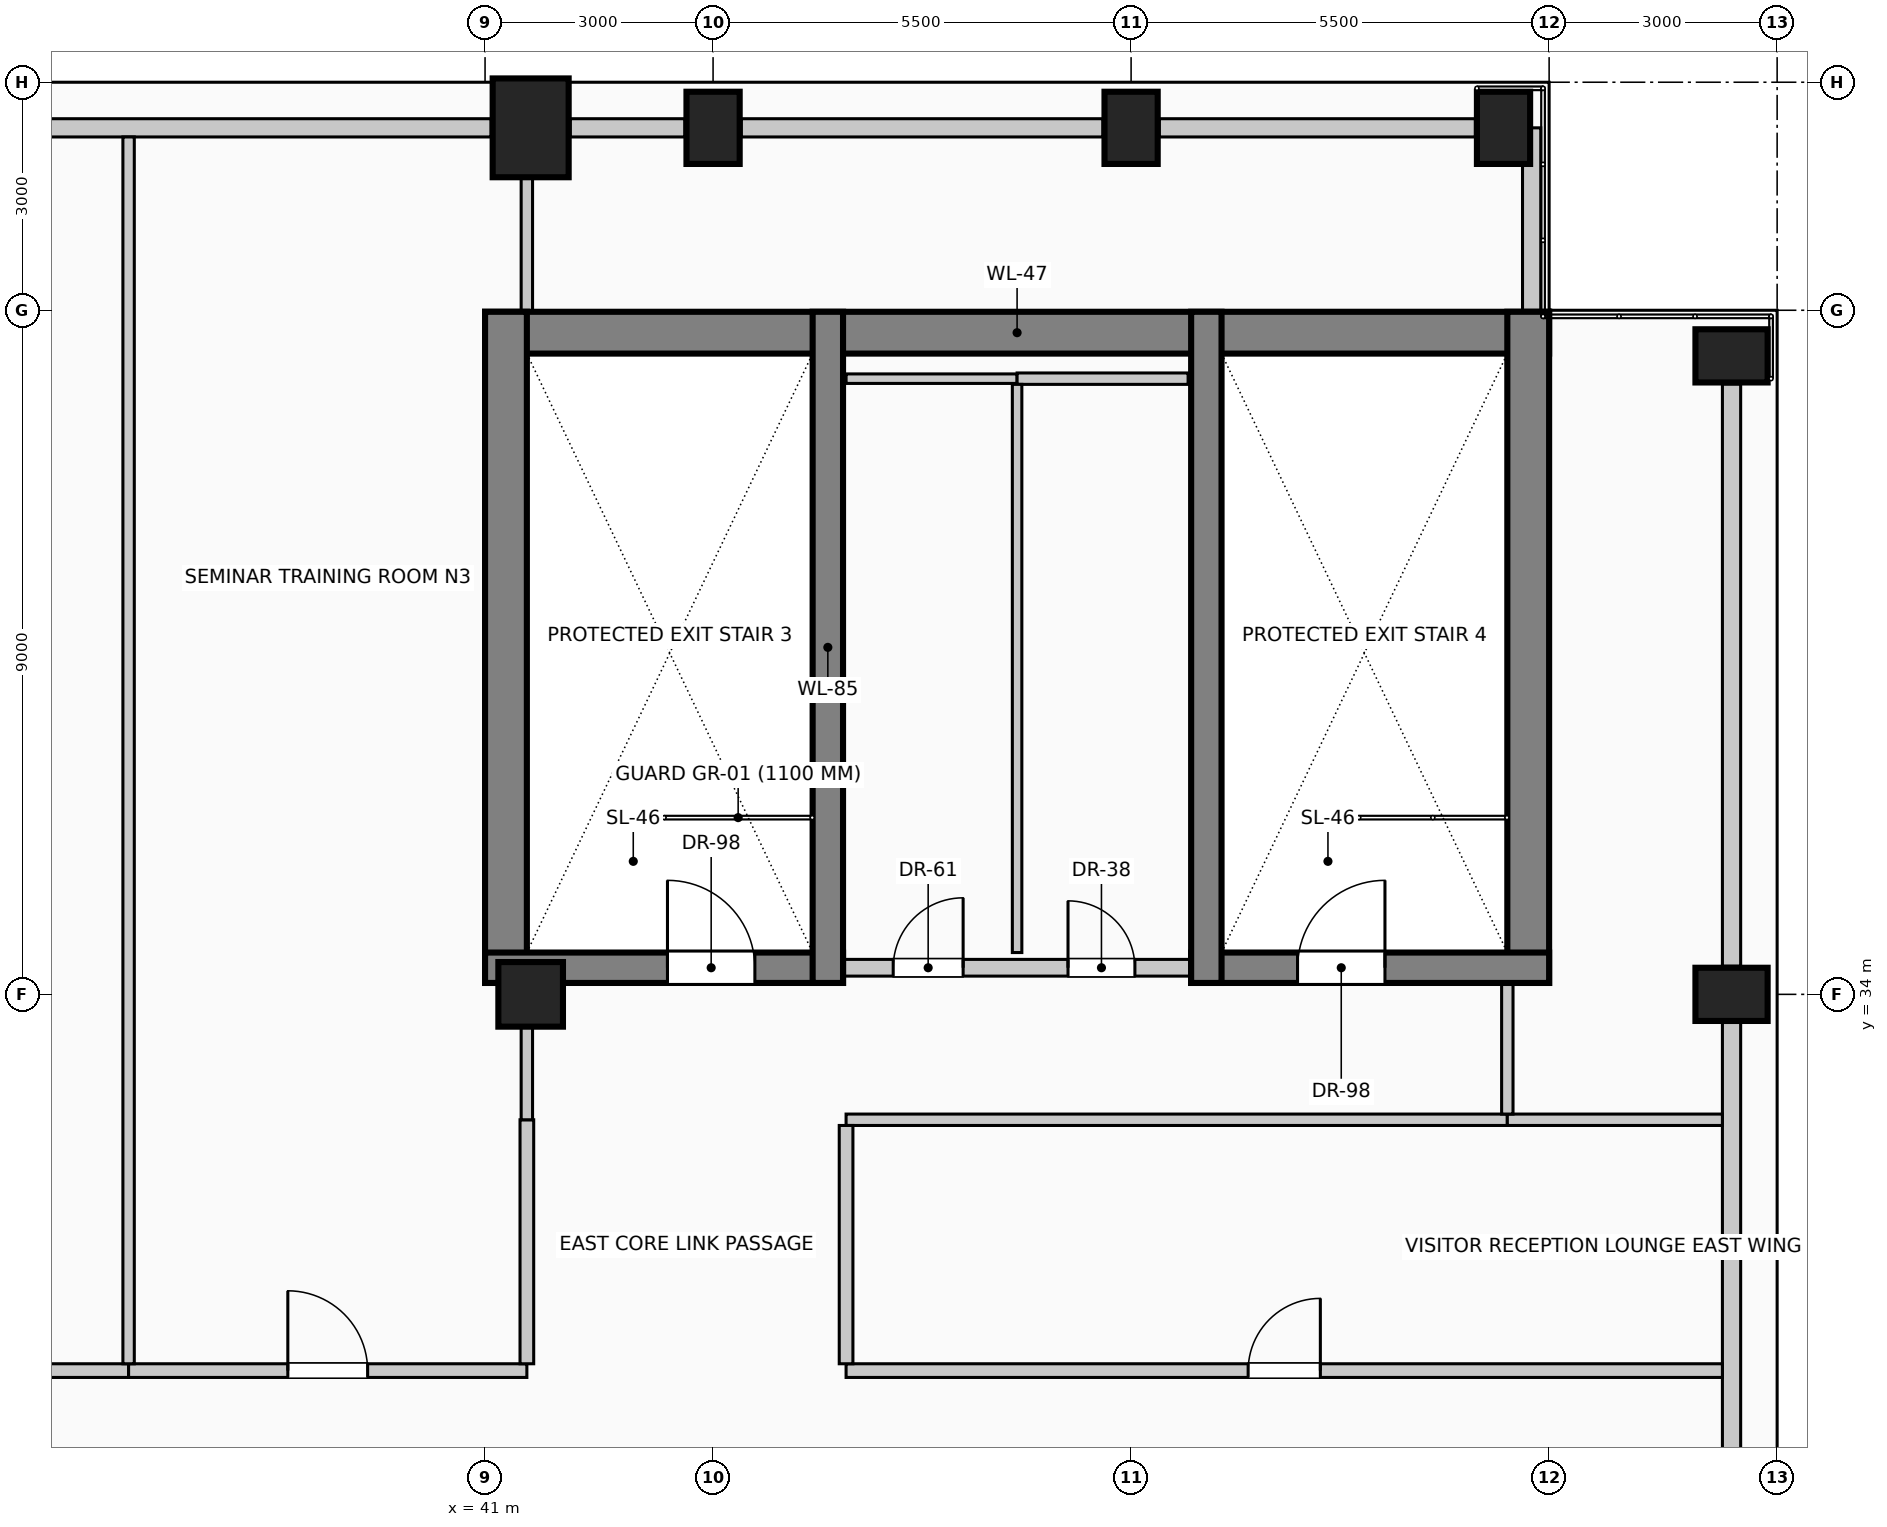
"""IFC4 building model, lengths in metres.
Left out: names, types, materials, properties, quantities, classifications, styles, units other than length and angle.
Written with IfcOpenShell. Run it as: python <this file> out.ifc"""

import sys

from ifc_helpers import new_model, si_unit, direction, frame, frame_2d, origin, origin_2d, place, context, subcontext, project, spatial, rectangle, circle, extrude, element, fill, save


model = new_model("IFC4")
c1 = context("Model", 3, precision=1e-05, world=origin(), true_north=direction((0.0, 1.0)))
c2 = subcontext(c1, "Body", "Model", "MODEL_VIEW")
j1 = project(units=[si_unit("LENGTHUNIT", "METRE"), si_unit("PLANEANGLEUNIT", "RADIAN")], contexts=[c1])
p1 = place(None, origin())
s1 = spatial("IfcSite", under=j1, at=p1, CompositionType="ELEMENT")
p2 = place(p1, origin())
s2 = spatial("IfcBuilding", under=s1, at=p2, CompositionType="ELEMENT")
p3 = place(p2, frame((0.0, 0.0, 285.0)))
s3 = spatial("IfcBuildingStorey", under=s2, at=p3, CompositionType="ELEMENT", Elevation=285.0)
p4 = place(p3, frame((41.0, 42.705, 0.0), z_axis=(0.0, 0.0, 1.0), x_axis=(1.0, 0.0, 0.0)))
e1 = element("IfcWall", 1, at=p4, inside=s3, PredefinedType="SHEAR", context=c2, shape_type="SweptSolid", body=[
    extrude(rectangle(XDim=14.0, YDim=0.55, at=frame_2d((7.0, 0.0))), origin(), (0.0, 0.0, 1.0), 4.0),
])
for number, where, z_axis, x_axis in (
    (2, (41.275, 34.15, 0.0), (0.0, 0.0, 1.0), (0.0, 1.0, 0.0)),
    (3, (54.725, 34.15, 0.0), (0.0, 0.0, 1.0), (0.0, 1.0, 0.0)),
):
    element("IfcWall", number, at=place(p3, frame(where, z_axis=z_axis, x_axis=x_axis)), inside=s3, PredefinedType="SHEAR", context=c2, shape_type="SweptSolid", body=[
        extrude(rectangle(XDim=8.83, YDim=0.55, at=frame_2d((4.415, 0.0))), origin(), (0.0, 0.0, 1.0), 4.0),
    ])
p5 = place(p3, frame((41.0, 34.35, 0.0), z_axis=(0.0, 0.0, 1.0), x_axis=(1.0, 0.0, 0.0)))
e4 = element("IfcWall", 4, at=p5, inside=s3, PredefinedType="SHEAR", context=c2, shape_type="SweptSolid", body=[
    extrude(rectangle(XDim=4.71, YDim=0.4, at=frame_2d((2.355, 0.0))), origin(), (0.0, 0.0, 1.0), 4.0),
])
p6 = place(p5, frame((2.4, 0.0, 0.0)))
e5 = element("IfcOpeningElement", 5, at=p6, cuts=e4, PredefinedType="OPENING", context=c2, shape_type="SweptSolid", body=[
    extrude(rectangle(XDim=1.15, YDim=2.1, at=frame_2d((0.575, 1.05))), frame((0.0, 0.21, 0.0), z_axis=(0.0, -1.0, 0.0), x_axis=(1.0, 0.0, 0.0)), (0.0, 0.0, 1.0), 0.42),
])
p7 = place(p3, frame((45.51, 34.15, 0.0), z_axis=(0.0, 0.0, 1.0), x_axis=(0.0, 1.0, 0.0)))
e6 = element("IfcWall", 6, at=p7, inside=s3, PredefinedType="SHEAR", context=c2, shape_type="SweptSolid", body=[
    extrude(rectangle(XDim=8.83, YDim=0.4, at=frame_2d((4.415, 0.0))), origin(), (0.0, 0.0, 1.0), 4.0),
])
p8 = place(p3, frame((50.29, 34.35, 0.0), z_axis=(0.0, 0.0, 1.0), x_axis=(1.0, 0.0, 0.0)))
e7 = element("IfcWall", 7, at=p8, inside=s3, PredefinedType="SHEAR", context=c2, shape_type="SweptSolid", body=[
    extrude(rectangle(XDim=4.71, YDim=0.4, at=frame_2d((2.355, 0.0))), origin(), (0.0, 0.0, 1.0), 4.0),
])
p9 = place(p8, frame((1.4, 0.0, 0.0)))
e8 = element("IfcOpeningElement", 8, at=p9, cuts=e7, PredefinedType="OPENING", context=c2, shape_type="SweptSolid", body=[
    extrude(rectangle(XDim=1.15, YDim=2.1, at=frame_2d((0.575, 1.05))), frame((0.0, 0.21, 0.0), z_axis=(0.0, -1.0, 0.0), x_axis=(1.0, 0.0, 0.0)), (0.0, 0.0, 1.0), 0.42),
])
p10 = place(p3, frame((50.49, 34.15, 0.0), z_axis=(0.0, 0.0, 1.0), x_axis=(0.0, 1.0, 0.0)))
e9 = element("IfcWall", 9, at=p10, inside=s3, PredefinedType="SHEAR", context=c2, shape_type="SweptSolid", body=[
    extrude(rectangle(XDim=8.83, YDim=0.4, at=frame_2d((4.415, 0.0))), origin(), (0.0, 0.0, 1.0), 4.0),
])
p11 = place(p3, frame((41.6, 45.4, 0.0), z_axis=(0.0, 0.0, 1.0), x_axis=(1.0, 0.0, 0.0)))
e10 = element("IfcColumn", 10, at=p11, inside=s3, PredefinedType="COLUMN", context=c2, shape_type="SweptSolid", body=[
    extrude(rectangle(XDim=1.0, YDim=1.3, at=origin_2d()), origin(), (0.0, 0.0, 1.0), 4.0),
])
for number, where, z_axis, x_axis in (
    (11, (44.0, 45.4, 0.0), (0.0, 0.0, 1.0), (1.0, 0.0, 0.0)),
    (12, (49.5, 45.4, 0.0), (0.0, 0.0, 1.0), (1.0, 0.0, 0.0)),
    (13, (54.4, 45.4, 0.0), (0.0, 0.0, 1.0), (1.0, 0.0, 0.0)),
    (14, (57.4, 34.0, 0.0), (0.0, 0.0, 1.0), (0.0, 1.0, 0.0)),
    (15, (57.4, 42.4, 0.0), (0.0, 0.0, 1.0), (0.0, 1.0, 0.0)),
):
    element("IfcColumn", number, at=place(p3, frame(where, z_axis=z_axis, x_axis=x_axis)), inside=s3, PredefinedType="COLUMN", context=c2, shape_type="SweptSolid", body=[
        extrude(rectangle(XDim=0.7, YDim=0.95, at=origin_2d()), origin(), (0.0, 0.0, 1.0), 4.0),
    ])
p12 = place(p3, frame((41.6, 34.0, 0.0), z_axis=(0.0, 0.0, 1.0), x_axis=(1.0, 0.0, 0.0)))
e16 = element("IfcColumn", 16, at=p12, inside=s3, PredefinedType="COLUMN", context=c2, shape_type="SweptSolid", body=[
    extrude(circle(Radius=0.425, at=origin_2d()), origin(), (0.0, 0.0, 1.0), 4.0),
])
p13 = place(p3, frame((34.52, 45.4, 0.0), z_axis=(0.0, 0.0, 1.0), x_axis=(1.0, 0.0, 0.0)))
e17 = element("IfcWall", 17, at=p13, inside=s3, PredefinedType="SOLIDWALL", context=c2, shape_type="SweptSolid", body=[
    extrude(rectangle(XDim=6.56, YDim=0.24, at=frame_2d((3.28, 0.0))), origin(), (0.0, 0.0, 1.0), 2.175),
])
p14 = place(p3, frame((42.12, 45.4, 0.0), z_axis=(0.0, 0.0, 1.0), x_axis=(1.0, 0.0, 0.0)))
e18 = element("IfcWall", 18, at=p14, inside=s3, PredefinedType="SOLIDWALL", context=c2, shape_type="SweptSolid", body=[
    extrude(rectangle(XDim=1.51, YDim=0.24, at=frame_2d((0.755, 0.0))), origin(), (0.0, 0.0, 1.0), 2.165),
])
p15 = place(p3, frame((44.37, 45.4, 0.0), z_axis=(0.0, 0.0, 1.0), x_axis=(1.0, 0.0, 0.0)))
e19 = element("IfcWall", 19, at=p15, inside=s3, PredefinedType="SOLIDWALL", context=c2, shape_type="SweptSolid", body=[
    extrude(rectangle(XDim=4.76, YDim=0.24, at=frame_2d((2.38, 0.0))), origin(), (0.0, 0.0, 1.0), 2.165),
])
p16 = place(p3, frame((49.87, 45.4, 0.0), z_axis=(0.0, 0.0, 1.0), x_axis=(1.0, 0.0, 0.0)))
e20 = element("IfcWall", 20, at=p16, inside=s3, PredefinedType="SOLIDWALL", context=c2, shape_type="SweptSolid", body=[
    extrude(rectangle(XDim=4.16, YDim=0.24, at=frame_2d((2.08, 0.0))), origin(), (0.0, 0.0, 1.0), 2.165),
])
p17 = place(p3, frame((57.4, 33.63, 0.0), z_axis=(0.0, 0.0, 1.0), x_axis=(0.0, -1.0, 0.0)))
e21 = element("IfcWall", 21, at=p17, inside=s3, PredefinedType="SOLIDWALL", context=c2, shape_type="SweptSolid", body=[
    extrude(rectangle(XDim=7.26, YDim=0.24, at=frame_2d((3.63, 0.0))), origin(), (0.0, 0.0, 1.0), 3.015),
])
p18 = place(p3, frame((57.4, 42.03, 0.0), z_axis=(0.0, 0.0, 1.0), x_axis=(0.0, -1.0, 0.0)))
e22 = element("IfcWall", 22, at=p18, inside=s3, PredefinedType="SOLIDWALL", context=c2, shape_type="SweptSolid", body=[
    extrude(rectangle(XDim=7.66, YDim=0.24, at=frame_2d((3.83, 0.0))), origin(), (0.0, 0.0, 1.0), 3.015),
])
p19 = place(p3, frame((54.77, 45.4, 0.0), z_axis=(0.0, 0.0, 1.0), x_axis=(0.0, -1.0, 0.0)))
e23 = element("IfcWall", 23, at=p19, inside=s3, PredefinedType="SOLIDWALL", context=c2, shape_type="SweptSolid", body=[
    extrude(rectangle(XDim=2.415, YDim=0.24, at=frame_2d((1.208, 0.0))), origin(), (0.0, 0.0, 1.0), 2.165),
])
p20 = place(p3, frame((45.72, 34.35, 0.0), z_axis=(0.0, 0.0, 1.0), x_axis=(1.0, 0.0, 0.0)))
e24 = element("IfcWall", 24, at=p20, inside=s3, PredefinedType="PARTITIONING", context=c2, shape_type="SweptSolid", body=[
    extrude(rectangle(XDim=4.56, YDim=0.22, at=frame_2d((2.28, 0.0))), origin(), (0.0, 0.0, 1.0), 2.16),
])
p21 = place(p20, frame((0.65, 0.0, 0.0)))
e25 = element("IfcOpeningElement", 25, at=p21, cuts=e24, PredefinedType="OPENING", context=c2, shape_type="SweptSolid", body=[
    extrude(rectangle(XDim=0.92, YDim=2.1, at=frame_2d((0.46, 1.05))), frame((0.0, 0.12, 0.0), z_axis=(0.0, -1.0, 0.0), x_axis=(1.0, 0.0, 0.0)), (0.0, 0.0, 1.0), 0.24),
])
p22 = place(p20, frame((2.95, 0.0, 0.0)))
e26 = element("IfcOpeningElement", 26, at=p22, cuts=e24, PredefinedType="OPENING", context=c2, shape_type="SweptSolid", body=[
    extrude(rectangle(XDim=0.88, YDim=2.1, at=frame_2d((0.44, 1.05))), frame((0.0, 0.12, 0.0), z_axis=(0.0, -1.0, 0.0), x_axis=(1.0, 0.0, 0.0)), (0.0, 0.0, 1.0), 0.24),
])
p23 = place(p3, frame((28.34, 29.05, 0.0), z_axis=(0.0, 0.0, 1.0), x_axis=(1.0, 0.0, 0.0)))
e27 = element("IfcWall", 27, at=p23, inside=s3, PredefinedType="PARTITIONING", context=c2, shape_type="SweptSolid", body=[
    extrude(rectangle(XDim=7.97, YDim=0.18, at=frame_2d((3.985, 0.0))), origin(), (0.0, 0.0, 1.0), 3.775),
])
p24 = place(p23, frame((3.51, 0.0, 0.0)))
e28 = element("IfcOpeningElement", 28, at=p24, cuts=e27, PredefinedType="OPENING", context=c2, shape_type="SweptSolid", body=[
    extrude(rectangle(XDim=0.95, YDim=2.15, at=frame_2d((0.475, 1.075))), frame((0.0, 0.1, 0.0), z_axis=(0.0, -1.0, 0.0), x_axis=(1.0, 0.0, 0.0)), (0.0, 0.0, 1.0), 0.2),
])
p25 = place(p3, frame((36.31, 29.05, 0.0), z_axis=(0.0, 0.0, 1.0), x_axis=(1.0, 0.0, 0.0)))
e29 = element("IfcWall", 29, at=p25, inside=s3, PredefinedType="PARTITIONING", context=c2, shape_type="SweptSolid", body=[
    extrude(rectangle(XDim=5.24, YDim=0.18, at=frame_2d((2.62, 0.0))), origin(), (0.0, 0.0, 1.0), 3.775),
])
p26 = place(p25, frame((2.095, 0.0, 0.0)))
e30 = element("IfcOpeningElement", 30, at=p26, cuts=e29, PredefinedType="OPENING", context=c2, shape_type="SweptSolid", body=[
    extrude(rectangle(XDim=1.05, YDim=2.15, at=frame_2d((0.525, 1.075))), frame((0.0, 0.1, 0.0), z_axis=(0.0, -1.0, 0.0), x_axis=(1.0, 0.0, 0.0)), (0.0, 0.0, 1.0), 0.2),
])
p27 = place(p3, frame((45.75, 29.05, 0.0), z_axis=(0.0, 0.0, 1.0), x_axis=(1.0, 0.0, 0.0)))
e31 = element("IfcWall", 31, at=p27, inside=s3, PredefinedType="PARTITIONING", context=c2, shape_type="SweptSolid", body=[
    extrude(rectangle(XDim=11.53, YDim=0.18, at=frame_2d((5.765, 0.0))), origin(), (0.0, 0.0, 1.0), 3.775),
])
p28 = place(p27, frame((5.29, 0.0, 0.0)))
e32 = element("IfcOpeningElement", 32, at=p28, cuts=e31, PredefinedType="OPENING", context=c2, shape_type="SweptSolid", body=[
    extrude(rectangle(XDim=0.95, YDim=2.15, at=frame_2d((0.475, 1.075))), frame((0.0, 0.1, 0.0), z_axis=(0.0, -1.0, 0.0), x_axis=(1.0, 0.0, 0.0)), (0.0, 0.0, 1.0), 0.2),
])
p29 = place(p3, frame((45.75, 32.35, 0.0), z_axis=(0.0, 0.0, 1.0), x_axis=(1.0, 0.0, 0.0)))
e33 = element("IfcWall", 33, at=p29, inside=s3, PredefinedType="PARTITIONING", context=c2, shape_type="SweptSolid", body=[
    extrude(rectangle(XDim=8.7, YDim=0.15, at=frame_2d((4.35, 0.0))), origin(), (0.0, 0.0, 1.0), 3.775),
])
p30 = place(p3, frame((54.45, 32.35, 0.0), z_axis=(0.0, 0.0, 1.0), x_axis=(1.0, 0.0, 0.0)))
e34 = element("IfcWall", 34, at=p30, inside=s3, PredefinedType="PARTITIONING", context=c2, shape_type="SweptSolid", body=[
    extrude(rectangle(XDim=2.83, YDim=0.15, at=frame_2d((1.415, 0.0))), origin(), (0.0, 0.0, 1.0), 3.775),
])
p31 = place(p3, frame((45.75, 42.1, 0.0), z_axis=(0.0, 0.0, 1.0), x_axis=(1.0, 0.0, 0.0)))
e35 = element("IfcWall", 35, at=p31, inside=s3, PredefinedType="PARTITIONING", context=c2, shape_type="SweptSolid", body=[
    extrude(rectangle(XDim=2.25, YDim=0.125, at=frame_2d((1.125, 0.0))), origin(), (0.0, 0.0, 1.0), 3.775),
])
p32 = place(p3, frame((48.0, 42.1, 0.0), z_axis=(0.0, 0.0, 1.0), x_axis=(1.0, 0.0, 0.0)))
e36 = element("IfcWall", 36, at=p32, inside=s3, PredefinedType="PARTITIONING", context=c2, shape_type="SweptSolid", body=[
    extrude(rectangle(XDim=2.25, YDim=0.15, at=frame_2d((1.125, 0.0))), origin(), (0.0, 0.0, 1.0), 3.775),
])
p33 = place(p3, frame((36.31, 29.14, 0.0), z_axis=(0.0, 0.0, 1.0), x_axis=(0.0, 1.0, 0.0)))
e37 = element("IfcWall", 37, at=p33, inside=s3, PredefinedType="PARTITIONING", context=c2, shape_type="SweptSolid", body=[
    extrude(rectangle(XDim=16.14, YDim=0.15, at=frame_2d((8.07, 0.0))), origin(), (0.0, 0.0, 1.0), 3.775),
])
p34 = place(p3, frame((41.55, 29.14, 0.0), z_axis=(0.0, 0.0, 1.0), x_axis=(0.0, 1.0, 0.0)))
e38 = element("IfcWall", 38, at=p34, inside=s3, PredefinedType="PARTITIONING", context=c2, shape_type="SweptSolid", body=[
    extrude(rectangle(XDim=3.21, YDim=0.18, at=frame_2d((1.605, 0.0))), origin(), (0.0, 0.0, 1.0), 3.22),
])
p35 = place(p3, frame((41.55, 32.35, 0.0), z_axis=(0.0, 0.0, 1.0), x_axis=(0.0, 1.0, 0.0)))
e39 = element("IfcWall", 39, at=p35, inside=s3, PredefinedType="PARTITIONING", context=c2, shape_type="SweptSolid", body=[
    extrude(rectangle(XDim=1.225, YDim=0.15, at=frame_2d((0.612, 0.0))), origin(), (0.0, 0.0, 1.0), 3.22),
])
p36 = place(p3, frame((41.55, 42.98, 0.0), z_axis=(0.0, 0.0, 1.0), x_axis=(0.0, 1.0, 0.0)))
e40 = element("IfcWall", 40, at=p36, inside=s3, PredefinedType="PARTITIONING", context=c2, shape_type="SweptSolid", body=[
    extrude(rectangle(XDim=1.77, YDim=0.15, at=frame_2d((0.885, 0.0))), origin(), (0.0, 0.0, 1.0), 3.775),
])
p37 = place(p3, frame((45.75, 29.14, 0.0), z_axis=(0.0, 0.0, 1.0), x_axis=(0.0, 1.0, 0.0)))
e41 = element("IfcWall", 41, at=p37, inside=s3, PredefinedType="PARTITIONING", context=c2, shape_type="SweptSolid", body=[
    extrude(rectangle(XDim=3.135, YDim=0.18, at=frame_2d((1.567, 0.0))), origin(), (0.0, 0.0, 1.0), 3.775),
])
p38 = place(p3, frame((48.0, 34.55, 0.0), z_axis=(0.0, 0.0, 1.0), x_axis=(0.0, 1.0, 0.0)))
e42 = element("IfcWall", 42, at=p38, inside=s3, PredefinedType="PARTITIONING", context=c2, shape_type="SweptSolid", body=[
    extrude(rectangle(XDim=7.475, YDim=0.125, at=frame_2d((3.737, 0.0))), origin(), (0.0, 0.0, 1.0), 3.775),
])
p39 = place(p3, frame((54.45, 32.425, 0.0), z_axis=(0.0, 0.0, 1.0), x_axis=(0.0, 1.0, 0.0)))
e43 = element("IfcWall", 43, at=p39, inside=s3, PredefinedType="PARTITIONING", context=c2, shape_type="SweptSolid", body=[
    extrude(rectangle(XDim=1.725, YDim=0.15, at=frame_2d((0.862, 0.0))), origin(), (0.0, 0.0, 1.0), 3.775),
])
p40 = place(p6, origin())
e44 = element("IfcDoor", 44, at=p40, inside=s3, OperationType="SINGLE_SWING_LEFT", PredefinedType="DOOR", context=c2, shape_type="SweptSolid", body=[
    extrude(rectangle(XDim=1.15, YDim=2.1, at=frame_2d((0.575, 1.05))), frame((0.0, 0.025, 0.0), z_axis=(0.0, -1.0, 0.0), x_axis=(1.0, 0.0, 0.0)), (0.0, 0.0, 1.0), 0.05),
])
fill(e5, e44)
p41 = place(p21, origin())
e45 = element("IfcDoor", 45, at=p41, inside=s3, OperationType="SINGLE_SWING_RIGHT", PredefinedType="DOOR", context=c2, shape_type="SweptSolid", body=[
    extrude(rectangle(XDim=0.92, YDim=2.1, at=frame_2d((0.46, 1.05))), frame((0.0, 0.025, 0.0), z_axis=(0.0, -1.0, 0.0), x_axis=(1.0, 0.0, 0.0)), (0.0, 0.0, 1.0), 0.05),
])
fill(e25, e45)
p42 = place(p22, origin())
e46 = element("IfcDoor", 46, at=p42, inside=s3, OperationType="SINGLE_SWING_LEFT", PredefinedType="DOOR", context=c2, shape_type="SweptSolid", body=[
    extrude(rectangle(XDim=0.88, YDim=2.1, at=frame_2d((0.44, 1.05))), frame((0.0, 0.025, 0.0), z_axis=(0.0, -1.0, 0.0), x_axis=(1.0, 0.0, 0.0)), (0.0, 0.0, 1.0), 0.05),
])
fill(e26, e46)
p43 = place(p9, origin())
e47 = element("IfcDoor", 47, at=p43, inside=s3, OperationType="SINGLE_SWING_RIGHT", PredefinedType="DOOR", context=c2, shape_type="SweptSolid", body=[
    extrude(rectangle(XDim=1.15, YDim=2.1, at=frame_2d((0.575, 1.05))), frame((0.0, 0.025, 0.0), z_axis=(0.0, -1.0, 0.0), x_axis=(1.0, 0.0, 0.0)), (0.0, 0.0, 1.0), 0.05),
])
fill(e8, e47)
p44 = place(p26, origin())
e48 = element("IfcDoor", 48, at=p44, inside=s3, OperationType="SINGLE_SWING_LEFT", PredefinedType="DOOR", context=c2, shape_type="SweptSolid", body=[
    extrude(rectangle(XDim=1.05, YDim=2.15, at=frame_2d((0.525, 1.075))), frame((0.0, 0.025, 0.0), z_axis=(0.0, -1.0, 0.0), x_axis=(1.0, 0.0, 0.0)), (0.0, 0.0, 1.0), 0.05),
])
fill(e30, e48)
p45 = place(p28, origin())
e49 = element("IfcDoor", 49, at=p45, inside=s3, OperationType="SINGLE_SWING_RIGHT", PredefinedType="DOOR", context=c2, shape_type="SweptSolid", body=[
    extrude(rectangle(XDim=0.95, YDim=2.15, at=frame_2d((0.475, 1.075))), frame((0.0, 0.025, 0.0), z_axis=(0.0, -1.0, 0.0), x_axis=(1.0, 0.0, 0.0)), (0.0, 0.0, 1.0), 0.05),
])
fill(e32, e49)
save(model, sys.argv[1])
